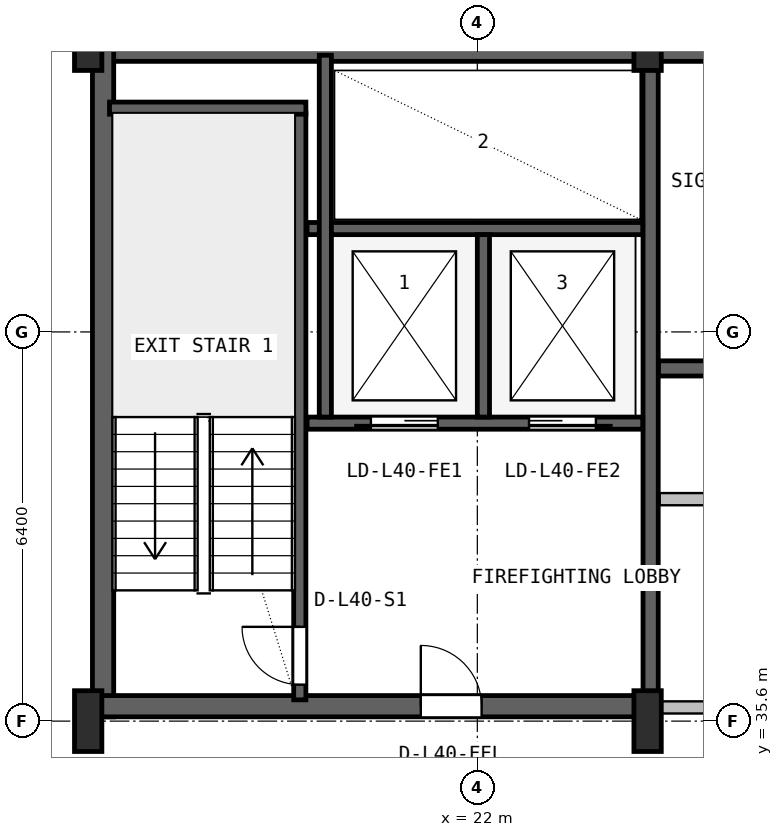
"""IFC4 building model, lengths in metres.
Left out: names, types, materials, properties, quantities, classifications, styles, units other than length and angle.
Written with IfcOpenShell. Run it as: python <this file> out.ifc"""

import sys

from ifc_helpers import new_model, si_unit, direction, frame, frame_2d, origin, origin_2d, place, context, subcontext, project, spatial, rectangle, i_section, extrude, source, transform, mapped, element, fill, save


model = new_model("IFC4")
c1 = context("Model", 3, precision=1e-05, world=origin(), true_north=direction((0.0, 1.0)))
c2 = subcontext(c1, "Body", "Model", "MODEL_VIEW")
j1 = project(units=[si_unit("LENGTHUNIT", "METRE"), si_unit("PLANEANGLEUNIT", "RADIAN")], contexts=[c1])
p1 = place(None, origin())
s1 = spatial("IfcSite", under=j1, at=p1, CompositionType="ELEMENT")
p2 = place(p1, origin())
s2 = spatial("IfcBuilding", under=s1, at=p2, CompositionType="ELEMENT")
p3 = place(p2, frame((0.0, 0.0, 164.8)))
s3 = spatial("IfcBuildingStorey", under=s2, at=p3, CompositionType="ELEMENT", Elevation=164.8)
p4 = place(p3, frame((15.6, 46.625, 0.0), z_axis=(0.0, 0.0, 1.0), x_axis=(1.0, 0.0, 0.0)))
e1 = element("IfcWall", 1, at=p4, inside=s3, PredefinedType="SHEAR", context=c2, shape_type="SweptSolid", body=[
    extrude(rectangle(XDim=36.8, YDim=0.35, at=frame_2d((18.4, 0.0))), origin(), (0.0, 0.0, 1.0), 3.55),
])
p5 = place(p3, frame((15.845, 35.67, 0.0), z_axis=(0.0, 0.0, 1.0), x_axis=(0.0, 1.0, 0.0)))
e2 = element("IfcWall", 2, at=p5, inside=s3, PredefinedType="SHEAR", context=c2, shape_type="SweptSolid", body=[
    extrude(rectangle(XDim=11.13, YDim=0.35, at=frame_2d((5.565, 0.0))), origin(), (0.0, 0.0, 1.0), 3.55),
])
p6 = place(p3, frame((15.67, 35.845, 0.0), z_axis=(0.0, 0.0, 1.0), x_axis=(1.0, 0.0, 0.0)))
e3 = element("IfcWall", 3, at=p6, inside=s3, PredefinedType="SHEAR", context=c2, shape_type="SweptSolid", body=[
    extrude(rectangle(XDim=9.13, YDim=0.35, at=frame_2d((4.565, 0.0))), origin(), (0.0, 0.0, 1.0), 3.55),
])
p7 = place(p6, frame((5.4, 0.0, 0.0)))
e4 = element("IfcOpeningElement", 4, at=p7, cuts=e3, PredefinedType="OPENING", context=c2, shape_type="SweptSolid", body=[
    extrude(rectangle(XDim=1.0, YDim=2.1, at=frame_2d((0.5, 1.05))), frame((0.0, 0.185, 0.0), z_axis=(0.0, -1.0, 0.0), x_axis=(1.0, 0.0, 0.0)), (0.0, 0.0, 1.0), 0.37),
])
m1 = source(origin(), c2, "Body", "SweptSolid", [
    extrude(i_section(OverallWidth=0.45, OverallDepth=1.0, WebThickness=0.016, FlangeThickness=0.03, FilletRadius=0.016, at=origin_2d()), origin(), (0.0, 0.0, 1.0), 3.8),
])
for number, where, z_axis, x_axis in (
    (5, (15.6, 35.6, 0.0), (0.0, 0.0, 1.0), (1.0, 0.0, 0.0)),
    (6, (15.6, 46.8, 0.0), (0.0, 0.0, 1.0), (1.0, 0.0, 0.0)),
    (7, (24.8, 35.6, 0.0), (0.0, 0.0, 1.0), (1.0, 0.0, 0.0)),
    (8, (24.8, 46.8, 0.0), (0.0, 0.0, 1.0), (1.0, 0.0, 0.0)),
):
    element("IfcColumn", number, at=place(p3, frame(where, z_axis=z_axis, x_axis=x_axis)), inside=s3, PredefinedType="COLUMN", context=c2, shape_type="MappedRepresentation", body=[
        mapped(m1, transform((0.0, 0.0, 0.0), x_axis=(1.0, 0.0, 0.0), y_axis=(0.0, 1.0, 0.0), z_axis=(0.0, 0.0, 1.0), scale=1.0)),
    ])
p8 = place(p3, frame((19.08, 35.95, 0.0), z_axis=(0.0, 0.0, 1.0), x_axis=(0.0, 1.0, 0.0)))
e9 = element("IfcWall", 9, at=p8, inside=s3, PredefinedType="SHEAR", context=c2, shape_type="SweptSolid", body=[
    extrude(rectangle(XDim=9.65, YDim=0.2, at=frame_2d((4.825, 0.0))), origin(), (0.0, 0.0, 1.0), 3.55),
])
p9 = place(p8, frame((0.25, 0.0, 0.0)))
e10 = element("IfcOpeningElement", 10, at=p9, cuts=e9, PredefinedType="OPENING", context=c2, shape_type="SweptSolid", body=[
    extrude(rectangle(XDim=0.95, YDim=2.1, at=frame_2d((0.475, 1.05))), frame((0.0, 0.11, 0.0), z_axis=(0.0, -1.0, 0.0), x_axis=(1.0, 0.0, 0.0)), (0.0, 0.0, 1.0), 0.22),
])
p10 = place(p3, frame((15.95, 45.68, 0.0), z_axis=(0.0, 0.0, 1.0), x_axis=(1.0, 0.0, 0.0)))
e11 = element("IfcWall", 11, at=p10, inside=s3, PredefinedType="SHEAR", context=c2, shape_type="SweptSolid", body=[
    extrude(rectangle(XDim=3.23, YDim=0.2, at=frame_2d((1.615, 0.0))), origin(), (0.0, 0.0, 1.0), 3.55),
])
p11 = place(p3, frame((24.85, 36.05, 0.0), z_axis=(0.0, 0.0, 1.0), x_axis=(0.0, 1.0, 0.0)))
e12 = element("IfcWall", 12, at=p11, inside=s3, PredefinedType="SHEAR", context=c2, shape_type="SweptSolid", body=[
    extrude(rectangle(XDim=10.45, YDim=0.25, at=frame_2d((5.225, 0.0))), origin(), (0.0, 0.0, 1.0), 3.55),
])
p12 = place(p3, frame((19.2, 40.5, 0.0), z_axis=(0.0, 0.0, 1.0), x_axis=(1.0, 0.0, 0.0)))
e13 = element("IfcWall", 13, at=p12, inside=s3, PredefinedType="SHEAR", context=c2, shape_type="SweptSolid", body=[
    extrude(rectangle(XDim=5.52, YDim=0.2, at=frame_2d((2.76, 0.0))), origin(), (0.0, 0.0, 1.0), 3.55),
])
p13 = place(p12, frame((1.05, 0.0, 0.0)))
e14 = element("IfcOpeningElement", 14, at=p13, cuts=e13, PredefinedType="OPENING", context=c2, shape_type="SweptSolid", body=[
    extrude(rectangle(XDim=1.1, YDim=2.18, at=frame_2d((0.55, 1.09))), frame((0.0, 0.11, 0.0), z_axis=(0.0, -1.0, 0.0), x_axis=(1.0, 0.0, 0.0)), (0.0, 0.0, 1.0), 0.22),
])
p14 = place(p12, frame((3.65, 0.0, 0.0)))
e15 = element("IfcOpeningElement", 15, at=p14, cuts=e13, PredefinedType="OPENING", context=c2, shape_type="SweptSolid", body=[
    extrude(rectangle(XDim=1.1, YDim=2.18, at=frame_2d((0.55, 1.09))), frame((0.0, 0.11, 0.0), z_axis=(0.0, -1.0, 0.0), x_axis=(1.0, 0.0, 0.0)), (0.0, 0.0, 1.0), 0.22),
])
p15 = place(p3, frame((19.2, 43.7, 0.0), z_axis=(0.0, 0.0, 1.0), x_axis=(1.0, 0.0, 0.0)))
e16 = element("IfcWall", 16, at=p15, inside=s3, PredefinedType="SHEAR", context=c2, shape_type="SweptSolid", body=[
    extrude(rectangle(XDim=5.52, YDim=0.2, at=frame_2d((2.76, 0.0))), origin(), (0.0, 0.0, 1.0), 3.55),
])
p16 = place(p3, frame((22.1, 40.6, 0.0), z_axis=(0.0, 0.0, 1.0), x_axis=(0.0, 1.0, 0.0)))
e17 = element("IfcWall", 17, at=p16, inside=s3, PredefinedType="SHEAR", context=c2, shape_type="SweptSolid", body=[
    extrude(rectangle(XDim=3.0, YDim=0.2, at=frame_2d((1.5, 0.0))), origin(), (0.0, 0.0, 1.0), 3.55),
])
p17 = place(p3, frame((19.5, 40.6, 0.0), z_axis=(0.0, 0.0, 1.0), x_axis=(0.0, 1.0, 0.0)))
e18 = element("IfcWall", 18, at=p17, inside=s3, PredefinedType="SHEAR", context=c2, shape_type="SweptSolid", body=[
    extrude(rectangle(XDim=5.95, YDim=0.2, at=frame_2d((2.975, 0.0))), origin(), (0.0, 0.0, 1.0), 3.55),
])
p18 = place(p3, frame((24.98, 41.4, 0.0), z_axis=(0.0, 0.0, 1.0), x_axis=(1.0, 0.0, 0.0)))
e19 = element("IfcWall", 19, at=p18, inside=s3, PredefinedType="SHEAR", context=c2, shape_type="SweptSolid", body=[
    extrude(rectangle(XDim=23.82, YDim=0.25, at=frame_2d((11.91, 0.0))), origin(), (0.0, 0.0, 1.0), 3.55),
])
p19 = place(p18, frame((8.87, 0.0, 0.0)))
e20 = element("IfcOpeningElement", 20, at=p19, cuts=e19, PredefinedType="OPENING", context=c2, shape_type="SweptSolid", body=[
    extrude(rectangle(XDim=1.1, YDim=2.18, at=frame_2d((0.55, 1.09))), frame((0.0, 0.135, 0.0), z_axis=(0.0, -1.0, 0.0), x_axis=(1.0, 0.0, 0.0)), (0.0, 0.0, 1.0), 0.27),
])
p20 = place(p18, frame((11.47, 0.0, 0.0)))
e21 = element("IfcOpeningElement", 21, at=p20, cuts=e19, PredefinedType="OPENING", context=c2, shape_type="SweptSolid", body=[
    extrude(rectangle(XDim=1.1, YDim=2.18, at=frame_2d((0.55, 1.09))), frame((0.0, 0.135, 0.0), z_axis=(0.0, -1.0, 0.0), x_axis=(1.0, 0.0, 0.0)), (0.0, 0.0, 1.0), 0.27),
])
p21 = place(p18, frame((14.07, 0.0, 0.0)))
e22 = element("IfcOpeningElement", 22, at=p21, cuts=e19, PredefinedType="OPENING", context=c2, shape_type="SweptSolid", body=[
    extrude(rectangle(XDim=1.1, YDim=2.18, at=frame_2d((0.55, 1.09))), frame((0.0, 0.135, 0.0), z_axis=(0.0, -1.0, 0.0), x_axis=(1.0, 0.0, 0.0)), (0.0, 0.0, 1.0), 0.27),
])
p22 = place(p18, frame((1.81, 0.0, 0.0)))
e23 = element("IfcOpeningElement", 23, at=p22, cuts=e19, PredefinedType="OPENING", context=c2, shape_type="SweptSolid", body=[
    extrude(rectangle(XDim=0.92, YDim=2.08, at=frame_2d((0.46, 1.04))), frame((0.0, 0.135, 0.0), z_axis=(0.0, -1.0, 0.0), x_axis=(1.0, 0.0, 0.0)), (0.0, 0.0, 1.0), 0.27),
])
p23 = place(p18, frame((5.71, 0.0, 0.0)))
e24 = element("IfcOpeningElement", 24, at=p23, cuts=e19, PredefinedType="OPENING", context=c2, shape_type="SweptSolid", body=[
    extrude(rectangle(XDim=0.92, YDim=2.08, at=frame_2d((0.46, 1.04))), frame((0.0, 0.135, 0.0), z_axis=(0.0, -1.0, 0.0), x_axis=(1.0, 0.0, 0.0)), (0.0, 0.0, 1.0), 0.27),
])
p24 = place(p3, frame((25.0, 35.825, 0.0), z_axis=(0.0, 0.0, 1.0), x_axis=(1.0, 0.0, 0.0)))
e25 = element("IfcWall", 25, at=p24, inside=s3, PredefinedType="SOLIDWALL", context=c2, shape_type="SweptSolid", body=[
    extrude(rectangle(XDim=12.95, YDim=0.2, at=frame_2d((6.475, 0.0))), origin(), (0.0, 0.0, 1.0), 2.575),
])
p25 = place(p3, frame((25.0, 39.25, 0.0), z_axis=(0.0, 0.0, 1.0), x_axis=(1.0, 0.0, 0.0)))
e26 = element("IfcWall", 26, at=p25, inside=s3, PredefinedType="SOLIDWALL", context=c2, shape_type="SweptSolid", body=[
    extrude(rectangle(XDim=12.95, YDim=0.2, at=frame_2d((6.475, 0.0))), origin(), (0.0, 0.0, 1.0), 3.53),
])
p26 = place(p25, frame((1.1, 0.0, 0.0)))
e27 = element("IfcOpeningElement", 27, at=p26, cuts=e26, PredefinedType="OPENING", context=c2, shape_type="SweptSolid", body=[
    extrude(rectangle(XDim=0.9, YDim=2.06, at=frame_2d((0.45, 1.03))), frame((0.0, 0.11, 0.0), z_axis=(0.0, -1.0, 0.0), x_axis=(1.0, 0.0, 0.0)), (0.0, 0.0, 1.0), 0.22),
])
p27 = place(p25, frame((4.5, 0.0, 0.0)))
e28 = element("IfcOpeningElement", 28, at=p27, cuts=e26, PredefinedType="OPENING", context=c2, shape_type="SweptSolid", body=[
    extrude(rectangle(XDim=0.9, YDim=2.06, at=frame_2d((0.45, 1.03))), frame((0.0, 0.11, 0.0), z_axis=(0.0, -1.0, 0.0), x_axis=(1.0, 0.0, 0.0)), (0.0, 0.0, 1.0), 0.22),
])
p28 = place(p25, frame((7.84, 0.0, 0.0)))
e29 = element("IfcOpeningElement", 29, at=p28, cuts=e26, PredefinedType="OPENING", context=c2, shape_type="SweptSolid", body=[
    extrude(rectangle(XDim=0.92, YDim=2.08, at=frame_2d((0.46, 1.04))), frame((0.0, 0.11, 0.0), z_axis=(0.0, -1.0, 0.0), x_axis=(1.0, 0.0, 0.0)), (0.0, 0.0, 1.0), 0.22),
])
p29 = place(p25, frame((10.875, 0.0, 0.0)))
e30 = element("IfcOpeningElement", 30, at=p29, cuts=e26, PredefinedType="OPENING", context=c2, shape_type="SweptSolid", body=[
    extrude(rectangle(XDim=1.2, YDim=2.1, at=frame_2d((0.6, 1.05))), frame((0.0, 0.11, 0.0), z_axis=(0.0, -1.0, 0.0), x_axis=(1.0, 0.0, 0.0)), (0.0, 0.0, 1.0), 0.22),
])
m2 = source(origin(), c2, "Body", "SweptSolid", [
    extrude(rectangle(XDim=0.95, YDim=2.1, at=frame_2d((0.475, 1.05))), frame((0.0, 0.025, 0.0), z_axis=(0.0, -1.0, 0.0), x_axis=(1.0, 0.0, 0.0)), (0.0, 0.0, 1.0), 0.05),
])
p30 = place(p9, origin())
e31 = element("IfcDoor", 31, at=p30, inside=s3, OperationType="SINGLE_SWING_RIGHT", PredefinedType="DOOR", context=c2, shape_type="MappedRepresentation", body=[
    mapped(m2, transform((0.0, 0.0, 0.0), x_axis=(1.0, 0.0, 0.0), y_axis=(0.0, 1.0, 0.0), z_axis=(0.0, 0.0, 1.0), scale=1.0)),
])
fill(e10, e31)
m3 = source(origin(), c2, "Body", "SweptSolid", [
    extrude(rectangle(XDim=1.0, YDim=2.1, at=frame_2d((0.5, 1.05))), frame((0.0, 0.025, 0.0), z_axis=(0.0, -1.0, 0.0), x_axis=(1.0, 0.0, 0.0)), (0.0, 0.0, 1.0), 0.05),
])
p31 = place(p7, origin())
e32 = element("IfcDoor", 32, at=p31, inside=s3, OperationType="SINGLE_SWING_LEFT", PredefinedType="DOOR", context=c2, shape_type="MappedRepresentation", body=[
    mapped(m3, transform((0.0, 0.0, 0.0), x_axis=(1.0, 0.0, 0.0), y_axis=(0.0, 1.0, 0.0), z_axis=(0.0, 0.0, 1.0), scale=1.0)),
])
fill(e4, e32)
m4 = source(origin(), c2, "Body", "SweptSolid", [
    extrude(rectangle(XDim=1.1, YDim=2.18, at=frame_2d((0.55, 1.09))), frame((0.0, 0.025, 0.0), z_axis=(0.0, -1.0, 0.0), x_axis=(1.0, 0.0, 0.0)), (0.0, 0.0, 1.0), 0.05),
])
p32 = place(p13, frame((1.1, 0.0, 0.0), z_axis=(0.0, 0.0, 1.0), x_axis=(-1.0, 0.0, 0.0)))
e33 = element("IfcDoor", 33, at=p32, inside=s3, OperationType="SLIDING_TO_LEFT", PredefinedType="DOOR", context=c2, shape_type="MappedRepresentation", body=[
    mapped(m4, transform((0.0, 0.0, 0.0), x_axis=(1.0, 0.0, 0.0), y_axis=(0.0, 1.0, 0.0), z_axis=(0.0, 0.0, 1.0), scale=1.0)),
])
fill(e14, e33)
p33 = place(p14, frame((1.1, 0.0, 0.0), z_axis=(0.0, 0.0, 1.0), x_axis=(-1.0, 0.0, 0.0)))
e34 = element("IfcDoor", 34, at=p33, inside=s3, OperationType="SLIDING_TO_RIGHT", PredefinedType="DOOR", context=c2, shape_type="MappedRepresentation", body=[
    mapped(m4, transform((0.0, 0.0, 0.0), x_axis=(1.0, 0.0, 0.0), y_axis=(0.0, 1.0, 0.0), z_axis=(0.0, 0.0, 1.0), scale=1.0)),
])
fill(e15, e34)
save(model, sys.argv[1])
